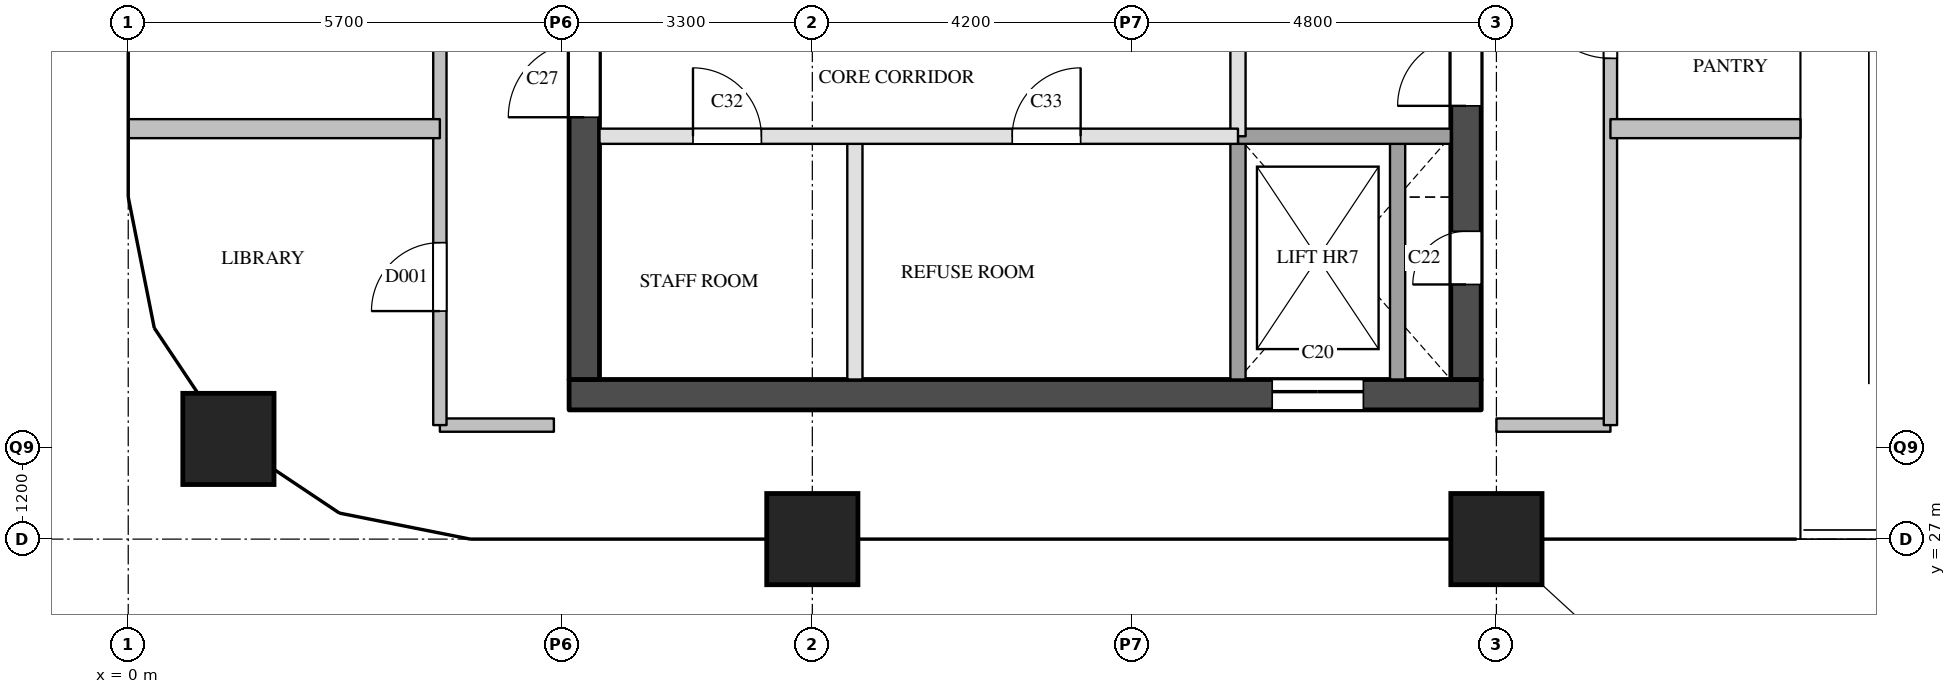
"""IFC4 building model, lengths in metres.
Left out: names, types, materials, properties, quantities, classifications, styles, units other than length and angle.
Written with IfcOpenShell. Run it as: python <this file> out.ifc"""

import sys

from ifc_helpers import new_model, si_unit, direction, frame, frame_2d, origin, origin_2d, place, context, subcontext, project, spatial, rectangle, extrude, element, fill, save


model = new_model("IFC4")
c1 = context("Model", 3, precision=1e-05, world=origin(), true_north=direction((0.0, 1.0)))
c2 = subcontext(c1, "Body", "Model", "MODEL_VIEW")
j1 = project(units=[si_unit("LENGTHUNIT", "METRE"), si_unit("PLANEANGLEUNIT", "RADIAN")], contexts=[c1])
p1 = place(None, origin())
s1 = spatial("IfcSite", under=j1, at=p1, CompositionType="ELEMENT")
p2 = place(p1, origin())
s2 = spatial("IfcBuilding", under=s1, at=p2, CompositionType="ELEMENT")
p3 = place(p2, frame((0.0, 0.0, 203.3)))
s3 = spatial("IfcBuildingStorey", under=s2, at=p3, CompositionType="ELEMENT", Elevation=203.3)
for number, where, z_axis, x_axis in (
    (1, (1.318, 28.318, 0.0), (0.0, 0.0, 1.0), (1.0, 0.0, 0.0)),
    (2, (9.0, 27.0, 0.0), (0.0, 0.0, 1.0), (1.0, 0.0, 0.0)),
    (3, (18.0, 27.0, 0.0), (0.0, 0.0, 1.0), (1.0, 0.0, 0.0)),
):
    element("IfcColumn", number, at=place(p3, frame(where, z_axis=z_axis, x_axis=x_axis)), inside=s3, PredefinedType="COLUMN", context=c2, shape_type="SweptSolid", body=[
        extrude(rectangle(XDim=1.2, YDim=1.2, at=origin_2d()), origin(), (0.0, 0.0, 1.0), 3.9),
    ])
p4 = place(p3, frame((5.8, 28.9, 0.0), z_axis=(0.0, 0.0, 1.0), x_axis=(1.0, 0.0, 0.0)))
e4 = element("IfcWall", 4, at=p4, inside=s3, PredefinedType="SHEAR", context=c2, shape_type="SweptSolid", body=[
    extrude(rectangle(XDim=12.0, YDim=0.4, at=frame_2d((6.0, 0.0))), origin(), (0.0, 0.0, 1.0), 3.6),
])
p5 = place(p4, frame((9.25, 0.0, 0.0)))
e5 = element("IfcOpeningElement", 5, at=p5, cuts=e4, PredefinedType="OPENING", context=c2, shape_type="SweptSolid", body=[
    extrude(rectangle(XDim=1.2, YDim=2.1, at=frame_2d((0.6, 1.05))), frame((0.0, 0.21, 0.0), z_axis=(0.0, -1.0, 0.0), x_axis=(1.0, 0.0, 0.0)), (0.0, 0.0, 1.0), 0.42),
])
p6 = place(p3, frame((6.0, 29.1, 0.0), z_axis=(0.0, 0.0, 1.0), x_axis=(0.0, 1.0, 0.0)))
e6 = element("IfcWall", 6, at=p6, inside=s3, PredefinedType="SHEAR", context=c2, shape_type="SweptSolid", body=[
    extrude(rectangle(XDim=20.3, YDim=0.4, at=frame_2d((10.15, 0.0))), origin(), (0.0, 0.0, 1.0), 3.6),
])
p7 = place(p6, frame((3.45, 0.0, 0.0)))
e7 = element("IfcOpeningElement", 7, at=p7, cuts=e6, PredefinedType="OPENING", context=c2, shape_type="SweptSolid", body=[
    extrude(rectangle(XDim=1.0, YDim=2.1, at=frame_2d((0.5, 1.05))), frame((0.0, 0.21, 0.0), z_axis=(0.0, -1.0, 0.0), x_axis=(1.0, 0.0, 0.0)), (0.0, 0.0, 1.0), 0.42),
])
p8 = place(p6, frame((16.4, 0.0, 0.0)))
e8 = element("IfcOpeningElement", 8, at=p8, cuts=e6, PredefinedType="OPENING", context=c2, shape_type="SweptSolid", body=[
    extrude(rectangle(XDim=1.0, YDim=2.1, at=frame_2d((0.5, 1.05))), frame((0.0, 0.21, 0.0), z_axis=(0.0, -1.0, 0.0), x_axis=(1.0, 0.0, 0.0)), (0.0, 0.0, 1.0), 0.42),
])
p9 = place(p3, frame((17.6, 29.1, 0.0), z_axis=(0.0, 0.0, 1.0), x_axis=(0.0, 1.0, 0.0)))
e9 = element("IfcWall", 9, at=p9, inside=s3, PredefinedType="SHEAR", context=c2, shape_type="SweptSolid", body=[
    extrude(rectangle(XDim=20.3, YDim=0.4, at=frame_2d((10.15, 0.0))), origin(), (0.0, 0.0, 1.0), 3.6),
])
p10 = place(p9, frame((1.25, 0.0, 0.0)))
e10 = element("IfcOpeningElement", 10, at=p10, cuts=e9, PredefinedType="OPENING", context=c2, shape_type="SweptSolid", body=[
    extrude(rectangle(XDim=0.7, YDim=2.1, at=frame_2d((0.35, 1.05))), frame((0.0, 0.21, 0.0), z_axis=(0.0, -1.0, 0.0), x_axis=(1.0, 0.0, 0.0)), (0.0, 0.0, 1.0), 0.42),
])
p11 = place(p9, frame((7.05, 0.0, 0.0)))
e11 = element("IfcOpeningElement", 11, at=p11, cuts=e9, PredefinedType="OPENING", context=c2, shape_type="SweptSolid", body=[
    extrude(rectangle(XDim=0.7, YDim=2.1, at=frame_2d((0.35, 1.05))), frame((0.0, 0.21, 0.0), z_axis=(0.0, -1.0, 0.0), x_axis=(1.0, 0.0, 0.0)), (0.0, 0.0, 1.0), 0.42),
])
p12 = place(p9, frame((3.6, 0.0, 0.0)))
e12 = element("IfcOpeningElement", 12, at=p12, cuts=e9, PredefinedType="OPENING", context=c2, shape_type="SweptSolid", body=[
    extrude(rectangle(XDim=1.8, YDim=2.1, at=frame_2d((0.9, 1.05))), frame((0.0, 0.21, 0.0), z_axis=(0.0, -1.0, 0.0), x_axis=(1.0, 0.0, 0.0)), (0.0, 0.0, 1.0), 0.42),
])
p13 = place(p3, frame((9.56, 29.1, 0.0), z_axis=(0.0, 0.0, 1.0), x_axis=(0.0, 1.0, 0.0)))
e13 = element("IfcWall", 13, at=p13, inside=s3, PredefinedType="PARTITIONING", context=c2, shape_type="SweptSolid", body=[
    extrude(rectangle(XDim=3.2, YDim=0.2, at=frame_2d((1.6, 0.0))), origin(), (0.0, 0.0, 1.0), 3.6),
])
p14 = place(p3, frame((14.6, 32.3, 0.0), z_axis=(0.0, 0.0, 1.0), x_axis=(0.0, 1.0, 0.0)))
e14 = element("IfcWall", 14, at=p14, inside=s3, PredefinedType="PARTITIONING", context=c2, shape_type="SweptSolid", body=[
    extrude(rectangle(XDim=2.6, YDim=0.2, at=frame_2d((1.3, 0.0))), origin(), (0.0, 0.0, 1.0), 3.6),
])
for number, where, z_axis, x_axis in (
    (15, (14.6, 29.1, 0.0), (0.0, 0.0, 1.0), (0.0, 1.0, 0.0)),
    (16, (16.7, 29.1, 0.0), (0.0, 0.0, 1.0), (0.0, 1.0, 0.0)),
):
    element("IfcWall", number, at=place(p3, frame(where, z_axis=z_axis, x_axis=x_axis)), inside=s3, PredefinedType="SOLIDWALL", context=c2, shape_type="SweptSolid", body=[
        extrude(rectangle(XDim=3.2, YDim=0.2, at=frame_2d((1.6, 0.0))), origin(), (0.0, 0.0, 1.0), 3.6),
    ])
p15 = place(p3, frame((6.2, 32.3, 0.0), z_axis=(0.0, 0.0, 1.0), x_axis=(1.0, 0.0, 0.0)))
e17 = element("IfcWall", 17, at=p15, inside=s3, PredefinedType="PARTITIONING", context=c2, shape_type="SweptSolid", body=[
    extrude(rectangle(XDim=8.4, YDim=0.2, at=frame_2d((4.2, 0.0))), origin(), (0.0, 0.0, 1.0), 3.6),
])
p16 = place(p15, frame((1.23, 0.0, 0.0)))
e18 = element("IfcOpeningElement", 18, at=p16, cuts=e17, PredefinedType="OPENING", context=c2, shape_type="SweptSolid", body=[
    extrude(rectangle(XDim=0.9, YDim=2.1, at=frame_2d((0.45, 1.05))), frame((0.0, 0.11, 0.0), z_axis=(0.0, -1.0, 0.0), x_axis=(1.0, 0.0, 0.0)), (0.0, 0.0, 1.0), 0.22),
])
p17 = place(p15, frame((5.43, 0.0, 0.0)))
e19 = element("IfcOpeningElement", 19, at=p17, cuts=e17, PredefinedType="OPENING", context=c2, shape_type="SweptSolid", body=[
    extrude(rectangle(XDim=0.9, YDim=2.1, at=frame_2d((0.45, 1.05))), frame((0.0, 0.11, 0.0), z_axis=(0.0, -1.0, 0.0), x_axis=(1.0, 0.0, 0.0)), (0.0, 0.0, 1.0), 0.22),
])
p18 = place(p3, frame((14.6, 32.3, 0.0), z_axis=(0.0, 0.0, 1.0), x_axis=(1.0, 0.0, 0.0)))
e20 = element("IfcWall", 20, at=p18, inside=s3, PredefinedType="SOLIDWALL", context=c2, shape_type="SweptSolid", body=[
    extrude(rectangle(XDim=2.8, YDim=0.2, at=frame_2d((1.4, 0.0))), origin(), (0.0, 0.0, 1.0), 3.6),
])
for number, where, z_axis, x_axis in (
    (21, (4.1, 28.5, 0.0), (0.0, 0.0, 1.0), (1.0, 0.0, 0.0)),
    (22, (18.0, 28.5, 0.0), (0.0, 0.0, 1.0), (1.0, 0.0, 0.0)),
):
    element("IfcWall", number, at=place(p3, frame(where, z_axis=z_axis, x_axis=x_axis)), inside=s3, PredefinedType="PARTITIONING", context=c2, shape_type="SweptSolid", body=[
        extrude(rectangle(XDim=1.5, YDim=0.175, at=frame_2d((0.75, 0.0))), origin(), (0.0, 0.0, 1.0), 3.6),
    ])
p19 = place(p3, frame((4.1, 28.5, 0.0), z_axis=(0.0, 0.0, 1.0), x_axis=(0.0, 1.0, 0.0)))
e23 = element("IfcWall", 23, at=p19, inside=s3, PredefinedType="PARTITIONING", context=c2, shape_type="SweptSolid", body=[
    extrude(rectangle(XDim=23.0, YDim=0.175, at=frame_2d((11.5, 0.0))), origin(), (0.0, 0.0, 1.0), 3.6),
])
p20 = place(p19, frame((1.5, 0.0, 0.0)))
e24 = element("IfcOpeningElement", 24, at=p20, cuts=e23, PredefinedType="OPENING", context=c2, shape_type="SweptSolid", body=[
    extrude(rectangle(XDim=0.9, YDim=2.1, at=frame_2d((0.45, 1.05))), frame((0.0, 0.097, 0.0), z_axis=(0.0, -1.0, 0.0), x_axis=(1.0, 0.0, 0.0)), (0.0, 0.0, 1.0), 0.195),
])
p21 = place(p19, frame((13.0, 0.0, 0.0)))
e25 = element("IfcOpeningElement", 25, at=p21, cuts=e23, PredefinedType="OPENING", context=c2, shape_type="SweptSolid", body=[
    extrude(rectangle(XDim=0.9, YDim=2.1, at=frame_2d((0.45, 1.05))), frame((0.0, 0.097, 0.0), z_axis=(0.0, -1.0, 0.0), x_axis=(1.0, 0.0, 0.0)), (0.0, 0.0, 1.0), 0.195),
])
p22 = place(p3, frame((19.5, 28.5, 0.0), z_axis=(0.0, 0.0, 1.0), x_axis=(0.0, 1.0, 0.0)))
e26 = element("IfcWall", 26, at=p22, inside=s3, PredefinedType="PARTITIONING", context=c2, shape_type="SweptSolid", body=[
    extrude(rectangle(XDim=6.75, YDim=0.175, at=frame_2d((3.375, 0.0))), origin(), (0.0, 0.0, 1.0), 3.6),
])
p23 = place(p22, frame((4.825, 0.0, 0.0)))
e27 = element("IfcOpeningElement", 27, at=p23, cuts=e26, PredefinedType="OPENING", context=c2, shape_type="SweptSolid", body=[
    extrude(rectangle(XDim=1.0, YDim=2.1, at=frame_2d((0.5, 1.05))), frame((0.0, 0.097, 0.0), z_axis=(0.0, -1.0, 0.0), x_axis=(1.0, 0.0, 0.0)), (0.0, 0.0, 1.0), 0.195),
])
p24 = place(p3, frame((0.0, 32.4, 0.0), z_axis=(0.0, 0.0, 1.0), x_axis=(1.0, 0.0, 0.0)))
e28 = element("IfcWall", 28, at=p24, inside=s3, PredefinedType="PARTITIONING", context=c2, shape_type="SweptSolid", body=[
    extrude(rectangle(XDim=4.1, YDim=0.25, at=frame_2d((2.05, 0.0))), origin(), (0.0, 0.0, 1.0), 2.6),
])
p25 = place(p3, frame((19.5, 32.4, 0.0), z_axis=(0.0, 0.0, 1.0), x_axis=(1.0, 0.0, 0.0)))
e29 = element("IfcWall", 29, at=p25, inside=s3, PredefinedType="PARTITIONING", context=c2, shape_type="SweptSolid", body=[
    extrude(rectangle(XDim=2.5, YDim=0.25, at=frame_2d((1.25, 0.0))), origin(), (0.0, 0.0, 1.0), 3.6),
])
p26 = place(p5, origin())
e30 = element("IfcDoor", 30, at=p26, inside=s3, OperationType="SLIDING_TO_LEFT", PredefinedType="DOOR", context=c2, shape_type="SweptSolid", body=[
    extrude(rectangle(XDim=1.2, YDim=2.1, at=frame_2d((0.6, 1.05))), frame((0.0, 0.025, 0.0), z_axis=(0.0, -1.0, 0.0), x_axis=(1.0, 0.0, 0.0)), (0.0, 0.0, 1.0), 0.05),
])
fill(e5, e30)
p27 = place(p10, origin())
e31 = element("IfcDoor", 31, at=p27, inside=s3, OperationType="SINGLE_SWING_LEFT", PredefinedType="DOOR", context=c2, shape_type="SweptSolid", body=[
    extrude(rectangle(XDim=0.7, YDim=2.1, at=frame_2d((0.35, 1.05))), frame((0.0, 0.025, 0.0), z_axis=(0.0, -1.0, 0.0), x_axis=(1.0, 0.0, 0.0)), (0.0, 0.0, 1.0), 0.05),
])
fill(e10, e31)
p28 = place(p12, origin())
e32 = element("IfcDoor", 32, at=p28, inside=s3, OperationType="DOUBLE_DOOR_SINGLE_SWING", PredefinedType="DOOR", context=c2, shape_type="SweptSolid", body=[
    extrude(rectangle(XDim=1.8, YDim=2.1, at=frame_2d((0.9, 1.05))), frame((0.0, 0.025, 0.0), z_axis=(0.0, -1.0, 0.0), x_axis=(1.0, 0.0, 0.0)), (0.0, 0.0, 1.0), 0.05),
])
fill(e12, e32)
p29 = place(p7, origin())
e33 = element("IfcDoor", 33, at=p29, inside=s3, OperationType="SINGLE_SWING_LEFT", PredefinedType="DOOR", context=c2, shape_type="SweptSolid", body=[
    extrude(rectangle(XDim=1.0, YDim=2.1, at=frame_2d((0.5, 1.05))), frame((0.0, 0.025, 0.0), z_axis=(0.0, -1.0, 0.0), x_axis=(1.0, 0.0, 0.0)), (0.0, 0.0, 1.0), 0.05),
])
fill(e7, e33)
p30 = place(p16, origin())
e34 = element("IfcDoor", 34, at=p30, inside=s3, OperationType="SINGLE_SWING_LEFT", PredefinedType="DOOR", context=c2, shape_type="SweptSolid", body=[
    extrude(rectangle(XDim=0.9, YDim=2.1, at=frame_2d((0.45, 1.05))), frame((0.0, 0.025, 0.0), z_axis=(0.0, -1.0, 0.0), x_axis=(1.0, 0.0, 0.0)), (0.0, 0.0, 1.0), 0.05),
])
fill(e18, e34)
p31 = place(p17, origin())
e35 = element("IfcDoor", 35, at=p31, inside=s3, OperationType="SINGLE_SWING_RIGHT", PredefinedType="DOOR", context=c2, shape_type="SweptSolid", body=[
    extrude(rectangle(XDim=0.9, YDim=2.1, at=frame_2d((0.45, 1.05))), frame((0.0, 0.025, 0.0), z_axis=(0.0, -1.0, 0.0), x_axis=(1.0, 0.0, 0.0)), (0.0, 0.0, 1.0), 0.05),
])
fill(e19, e35)
p32 = place(p20, origin())
e36 = element("IfcDoor", 36, at=p32, inside=s3, OperationType="SINGLE_SWING_LEFT", PredefinedType="DOOR", context=c2, shape_type="SweptSolid", body=[
    extrude(rectangle(XDim=0.9, YDim=2.1, at=frame_2d((0.45, 1.05))), frame((0.0, 0.025, 0.0), z_axis=(0.0, -1.0, 0.0), x_axis=(1.0, 0.0, 0.0)), (0.0, 0.0, 1.0), 0.05),
])
fill(e24, e36)
p33 = place(p23, origin())
e37 = element("IfcDoor", 37, at=p33, inside=s3, OperationType="SINGLE_SWING_RIGHT", PredefinedType="DOOR", context=c2, shape_type="SweptSolid", body=[
    extrude(rectangle(XDim=1.0, YDim=2.1, at=frame_2d((0.5, 1.05))), frame((0.0, 0.025, 0.0), z_axis=(0.0, -1.0, 0.0), x_axis=(1.0, 0.0, 0.0)), (0.0, 0.0, 1.0), 0.05),
])
fill(e27, e37)
save(model, sys.argv[1])
